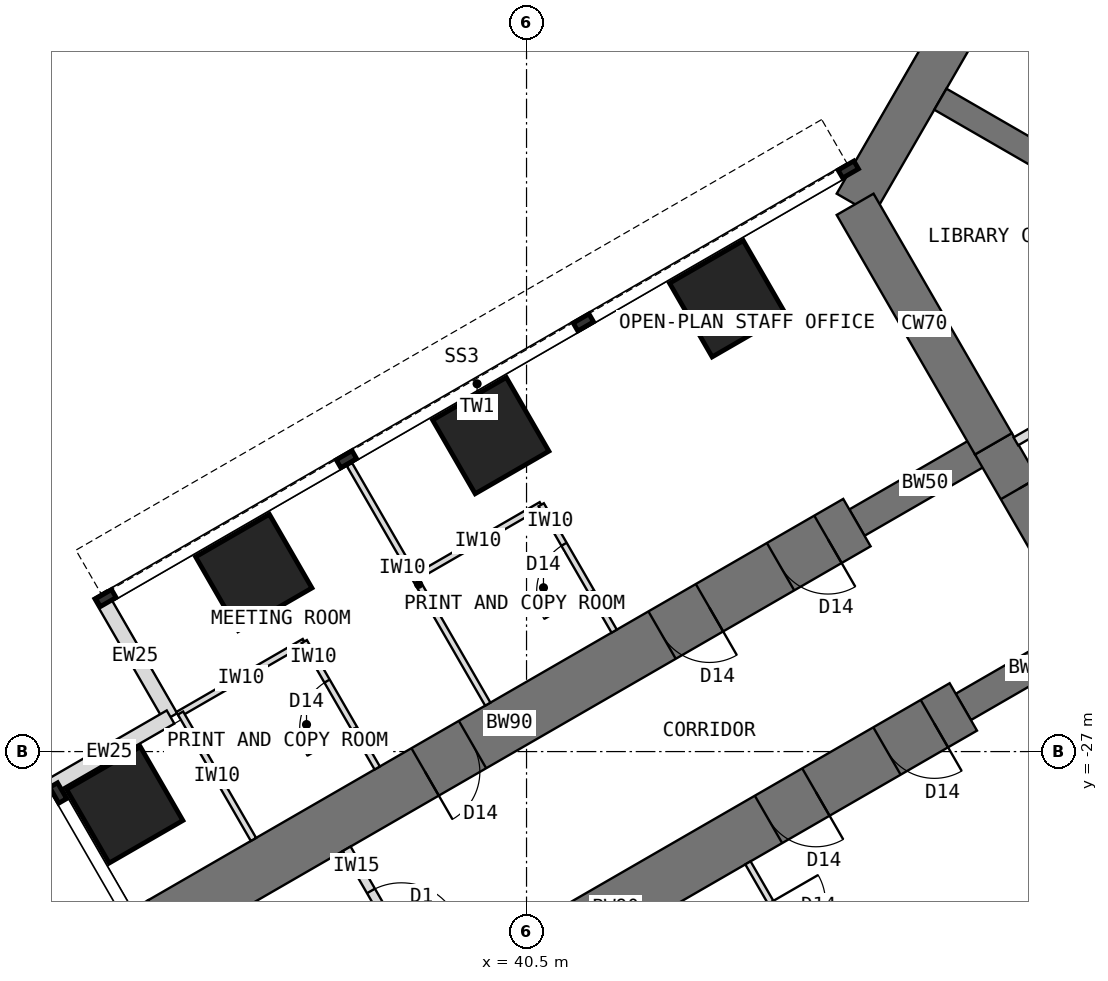
"""IFC4 building model, lengths in metres.
Left out: names, types, materials, properties, quantities, classifications, styles, units other than length and angle.
Written with IfcOpenShell. Run it as: python <this file> out.ifc"""

import sys

from ifc_helpers import new_model, si_unit, direction, frame, frame_2d, origin, origin_2d, place, context, subcontext, project, spatial, rectangle, extrude, element, fill, save


model = new_model("IFC4")
c1 = context("Model", 3, precision=1e-05, world=origin(), true_north=direction((0.0, 1.0)))
c2 = subcontext(c1, "Body", "Model", "MODEL_VIEW")
j1 = project(units=[si_unit("LENGTHUNIT", "METRE"), si_unit("PLANEANGLEUNIT", "RADIAN")], contexts=[c1])
p1 = place(None, origin())
s1 = spatial("IfcSite", under=j1, at=p1, CompositionType="ELEMENT")
p2 = place(p1, origin())
s2 = spatial("IfcBuilding", under=s1, at=p2, CompositionType="ELEMENT")
p3 = place(p2, frame((0.0, 0.0, 72.5)))
s3 = spatial("IfcBuildingStorey", under=s2, at=p3, CompositionType="ELEMENT", Elevation=72.5)
p4 = place(p3, frame((52.202, -7.092, 0.0), z_axis=(0.0, 0.0, 1.0), x_axis=(-0.500005998175, -0.866021940709, 0.0)))
e1 = element("IfcWall", 1, at=p4, inside=s3, PredefinedType="SHEAR", context=c2, shape_type="SweptSolid", body=[
    extrude(rectangle(XDim=12.596, YDim=0.7, at=frame_2d((6.298, 0.0))), origin(), (0.0, 0.0, 1.0), 4.0),
])
p5 = place(p3, frame((45.904, -18.0, 0.0), z_axis=(0.0, 0.0, 1.0), x_axis=(0.500024481964, -0.866011268655, 0.0)))
e2 = element("IfcWall", 2, at=p5, inside=s3, PredefinedType="SHEAR", context=c2, shape_type="SweptSolid", body=[
    extrude(rectangle(XDim=4.548, YDim=0.7, at=frame_2d((2.274, 0.0))), origin(), (0.0, 0.0, 1.0), 4.0),
])
p6 = place(p3, frame((48.178, -21.939, 0.0), z_axis=(0.0, 0.0, 1.0), x_axis=(0.500010275428, -0.866019471182, 0.0)))
e3 = element("IfcWall", 3, at=p6, inside=s3, PredefinedType="SHEAR", context=c2, shape_type="SweptSolid", body=[
    extrude(rectangle(XDim=3.5, YDim=0.7, at=frame_2d((1.75, 0.0))), origin(), (0.0, 0.0, 1.0), 4.0),
])
p7 = place(p6, frame((0.85, 0.0, 0.0)))
e4 = element("IfcOpeningElement", 4, at=p7, cuts=e3, PredefinedType="OPENING", context=c2, shape_type="SweptSolid", body=[
    extrude(rectangle(XDim=1.8, YDim=2.1, at=frame_2d((0.9, 1.05))), frame((0.0, 0.36, 0.0), z_axis=(0.0, -1.0, 0.0), x_axis=(1.0, 0.0, 0.0)), (0.0, 0.0, 1.0), 0.72),
])
p8 = place(p3, frame((49.928, -24.97, 0.0), z_axis=(0.0, 0.0, 1.0), x_axis=(-0.866031863473, -0.499988811324, 0.0)))
e5 = element("IfcWall", 5, at=p8, inside=s3, PredefinedType="SHEAR", context=c2, shape_type="SweptSolid", body=[
    extrude(rectangle(XDim=2.592, YDim=0.5, at=frame_2d((1.296, 0.0))), origin(), (0.0, 0.0, 1.0), 4.0),
])
p9 = place(p3, frame((47.684, -26.266, 0.0), z_axis=(0.0, 0.0, 1.0), x_axis=(-0.866027579429, -0.499996231654, 0.0)))
e6 = element("IfcWall", 6, at=p9, inside=s3, PredefinedType="SHEAR", context=c2, shape_type="SweptSolid", body=[
    extrude(rectangle(XDim=13.2, YDim=0.9, at=frame_2d((6.6, 0.0))), origin(), (0.0, 0.0, 1.0), 4.0),
])
p10 = place(p9, frame((0.55, 0.0, 0.0)))
e7 = element("IfcOpeningElement", 7, at=p10, cuts=e6, PredefinedType="OPENING", context=c2, shape_type="SweptSolid", body=[
    extrude(rectangle(XDim=0.9, YDim=2.1, at=frame_2d((0.45, 1.05))), frame((0.0, 0.46, 0.0), z_axis=(0.0, -1.0, 0.0), x_axis=(1.0, 0.0, 0.0)), (0.0, 0.0, 1.0), 0.92),
])
p11 = place(p9, frame((2.8, 0.0, 0.0)))
e8 = element("IfcOpeningElement", 8, at=p11, cuts=e6, PredefinedType="OPENING", context=c2, shape_type="SweptSolid", body=[
    extrude(rectangle(XDim=0.9, YDim=2.1, at=frame_2d((0.45, 1.05))), frame((0.0, 0.46, 0.0), z_axis=(0.0, -1.0, 0.0), x_axis=(1.0, 0.0, 0.0)), (0.0, 0.0, 1.0), 0.92),
])
p12 = place(p9, frame((7.3, 0.0, 0.0)))
e9 = element("IfcOpeningElement", 9, at=p12, cuts=e6, PredefinedType="OPENING", context=c2, shape_type="SweptSolid", body=[
    extrude(rectangle(XDim=0.9, YDim=2.1, at=frame_2d((0.45, 1.05))), frame((0.0, 0.46, 0.0), z_axis=(0.0, -1.0, 0.0), x_axis=(1.0, 0.0, 0.0)), (0.0, 0.0, 1.0), 0.92),
])
p13 = place(p3, frame((48.178, -21.939, 0.0), z_axis=(0.0, 0.0, 1.0), x_axis=(-0.866072649678, -0.499918158782, 0.0)))
e10 = element("IfcWall", 10, at=p13, inside=s3, PredefinedType="SHEAR", context=c2, shape_type="SweptSolid", body=[
    extrude(rectangle(XDim=2.592, YDim=0.5, at=frame_2d((1.296, 0.0))), origin(), (0.0, 0.0, 1.0), 4.0),
])
p14 = place(p3, frame((45.934, -23.234, 0.0), z_axis=(0.0, 0.0, 1.0), x_axis=(-0.866019570528, -0.500010103361, 0.0)))
e11 = element("IfcWall", 11, at=p14, inside=s3, PredefinedType="SHEAR", context=c2, shape_type="SweptSolid", body=[
    extrude(rectangle(XDim=13.2, YDim=0.9, at=frame_2d((6.6, 0.0))), origin(), (0.0, 0.0, 1.0), 4.0),
])
p15 = place(p14, frame((0.55, 0.0, 0.0)))
e12 = element("IfcOpeningElement", 12, at=p15, cuts=e11, PredefinedType="OPENING", context=c2, shape_type="SweptSolid", body=[
    extrude(rectangle(XDim=0.9, YDim=2.1, at=frame_2d((0.45, 1.05))), frame((0.0, 0.46, 0.0), z_axis=(0.0, -1.0, 0.0), x_axis=(1.0, 0.0, 0.0)), (0.0, 0.0, 1.0), 0.92),
])
p16 = place(p14, frame((2.8, 0.0, 0.0)))
e13 = element("IfcOpeningElement", 13, at=p16, cuts=e11, PredefinedType="OPENING", context=c2, shape_type="SweptSolid", body=[
    extrude(rectangle(XDim=0.9, YDim=2.1, at=frame_2d((0.45, 1.05))), frame((0.0, 0.46, 0.0), z_axis=(0.0, -1.0, 0.0), x_axis=(1.0, 0.0, 0.0)), (0.0, 0.0, 1.0), 0.92),
])
p17 = place(p14, frame((7.3, 0.0, 0.0)))
e14 = element("IfcOpeningElement", 14, at=p17, cuts=e11, PredefinedType="OPENING", context=c2, shape_type="SweptSolid", body=[
    extrude(rectangle(XDim=0.9, YDim=2.1, at=frame_2d((0.45, 1.05))), frame((0.0, 0.46, 0.0), z_axis=(0.0, -1.0, 0.0), x_axis=(1.0, 0.0, 0.0)), (0.0, 0.0, 1.0), 0.92),
])
for number, where, z_axis, x_axis in (
    (15, (43.809, -19.554, 0.0), (0.0, 0.0, 1.0), (0.866, 0.5, 0.0)),
    (16, (39.912, -21.804, 0.0), (0.0, 0.0, 1.0), (0.866, 0.5, 0.0)),
    (17, (36.014, -24.054, 0.0), (0.0, 0.0, 1.0), (0.866, 0.5, 0.0)),
    (18, (33.892, -27.877, 0.0), (0.0, 0.0, 1.0), (0.866, 0.5, 0.0)),
):
    element("IfcColumn", number, at=place(p3, frame(where, z_axis=z_axis, x_axis=x_axis)), inside=s3, PredefinedType="COLUMN", context=c2, shape_type="SweptSolid", body=[
        extrude(rectangle(XDim=1.4, YDim=1.4, at=origin_2d()), origin(), (0.0, 0.0, 1.0), 4.0),
    ])
for number, where, z_axis, x_axis in (
    (19, (33.483, -24.419, 0.0), (0.0, 0.0, 1.0), (0.5, -0.866, 0.0)),
    (20, (34.645, -26.432, 0.0), (0.0, 0.0, 1.0), (-0.866, -0.5, 0.0)),
):
    element("IfcWall", number, at=place(p3, frame(where, z_axis=z_axis, x_axis=x_axis)), inside=s3, PredefinedType="STANDARD", context=c2, shape_type="SweptSolid", body=[
        extrude(rectangle(XDim=2.325, YDim=0.25, at=frame_2d((1.163, 0.0))), origin(), (0.0, 0.0, 1.0), 3.8),
    ])
p18 = place(p3, frame((34.502, -29.834, 0.0), z_axis=(0.0, 0.0, 1.0), x_axis=(-0.866054481515, -0.499949632511, 0.0)))
e21 = element("IfcWall", 21, at=p18, inside=s3, PredefinedType="PARTITIONING", context=c2, shape_type="SweptSolid", body=[
    extrude(rectangle(XDim=0.31, YDim=0.9, at=frame_2d((0.155, 0.0))), origin(), (0.0, 0.0, 1.0), 3.8),
])
p19 = place(p3, frame((52.38, -19.201, 0.0), z_axis=(0.0, 0.0, 1.0), x_axis=(-0.866023886965, 0.500002627198, 0.0)))
e22 = element("IfcWall", 22, at=p19, inside=s3, PredefinedType="SHEAR", context=c2, shape_type="SweptSolid", body=[
    extrude(rectangle(XDim=5.858, YDim=0.4, at=frame_2d((2.929, 0.0))), origin(), (0.0, 0.0, 1.0), 4.0),
])
p20 = place(p3, frame((44.141, -28.83, 0.0), z_axis=(0.0, 0.0, 1.0), x_axis=(0.500077600433, -0.865980596518, 0.0)))
e23 = element("IfcWall", 23, at=p20, inside=s3, PredefinedType="PARTITIONING", context=c2, shape_type="SweptSolid", body=[
    extrude(rectangle(XDim=2.4, YDim=0.1, at=frame_2d((1.2, 0.0))), origin(), (0.0, 0.0, 1.0), 3.8),
])
p21 = place(p20, frame((0.75, 0.0, 0.0)))
e24 = element("IfcOpeningElement", 24, at=p21, cuts=e23, PredefinedType="OPENING", context=c2, shape_type="SweptSolid", body=[
    extrude(rectangle(XDim=0.9, YDim=2.1, at=frame_2d((0.45, 1.05))), frame((0.0, 0.06, 0.0), z_axis=(0.0, -1.0, 0.0), x_axis=(1.0, 0.0, 0.0)), (0.0, 0.0, 1.0), 0.12),
])
p22 = place(p3, frame((39.863, -26.22, 0.0), z_axis=(0.0, 0.0, 1.0), x_axis=(-0.500022803284, 0.866012237902, 0.0)))
e25 = element("IfcWall", 25, at=p22, inside=s3, PredefinedType="PARTITIONING", context=c2, shape_type="SweptSolid", body=[
    extrude(rectangle(XDim=4.55, YDim=0.1, at=frame_2d((2.275, 0.0))), origin(), (0.0, 0.0, 1.0), 3.8),
])
p23 = place(p3, frame((40.741, -22.941, 0.0), z_axis=(0.0, 0.0, 1.0), x_axis=(-0.865980596518, -0.500077600433, 0.0)))
e26 = element("IfcWall", 26, at=p23, inside=s3, PredefinedType="PARTITIONING", context=c2, shape_type="SweptSolid", body=[
    extrude(rectangle(XDim=2.4, YDim=0.1, at=frame_2d((1.2, 0.0))), origin(), (0.0, 0.0, 1.0), 3.8),
])
p24 = place(p3, frame((41.941, -25.02, 0.0), z_axis=(0.0, 0.0, 1.0), x_axis=(-0.499957262057, 0.866050077142, 0.0)))
e27 = element("IfcWall", 27, at=p24, inside=s3, PredefinedType="PARTITIONING", context=c2, shape_type="SweptSolid", body=[
    extrude(rectangle(XDim=2.4, YDim=0.1, at=frame_2d((1.2, 0.0))), origin(), (0.0, 0.0, 1.0), 3.8),
])
p25 = place(p24, frame((0.75, 0.0, 0.0)))
e28 = element("IfcOpeningElement", 28, at=p25, cuts=e27, PredefinedType="OPENING", context=c2, shape_type="SweptSolid", body=[
    extrude(rectangle(XDim=0.9, YDim=2.1, at=frame_2d((0.45, 1.05))), frame((0.0, 0.06, 0.0), z_axis=(0.0, -1.0, 0.0), x_axis=(1.0, 0.0, 0.0)), (0.0, 0.0, 1.0), 0.12),
])
p26 = place(p3, frame((36.844, -25.191, 0.0), z_axis=(0.0, 0.0, 1.0), x_axis=(-0.865980596518, -0.500077600433, 0.0)))
e29 = element("IfcWall", 29, at=p26, inside=s3, PredefinedType="PARTITIONING", context=c2, shape_type="SweptSolid", body=[
    extrude(rectangle(XDim=2.4, YDim=0.1, at=frame_2d((1.2, 0.0))), origin(), (0.0, 0.0, 1.0), 3.8),
])
p27 = place(p3, frame((38.044, -27.27, 0.0), z_axis=(0.0, 0.0, 1.0), x_axis=(-0.500033551112, 0.866006032174, 0.0)))
e30 = element("IfcWall", 30, at=p27, inside=s3, PredefinedType="PARTITIONING", context=c2, shape_type="SweptSolid", body=[
    extrude(rectangle(XDim=2.4, YDim=0.1, at=frame_2d((1.2, 0.0))), origin(), (0.0, 0.0, 1.0), 3.8),
])
p28 = place(p27, frame((0.75, 0.0, 0.0)))
e31 = element("IfcOpeningElement", 31, at=p28, cuts=e30, PredefinedType="OPENING", context=c2, shape_type="SweptSolid", body=[
    extrude(rectangle(XDim=0.9, YDim=2.1, at=frame_2d((0.45, 1.05))), frame((0.0, 0.06, 0.0), z_axis=(0.0, -1.0, 0.0), x_axis=(1.0, 0.0, 0.0)), (0.0, 0.0, 1.0), 0.12),
])
p29 = place(p3, frame((36.009, -28.445, 0.0), z_axis=(0.0, 0.0, 1.0), x_axis=(-0.500033551112, 0.866006032174, 0.0)))
e32 = element("IfcWall", 32, at=p29, inside=s3, PredefinedType="PARTITIONING", context=c2, shape_type="SweptSolid", body=[
    extrude(rectangle(XDim=2.4, YDim=0.1, at=frame_2d((1.2, 0.0))), origin(), (0.0, 0.0, 1.0), 3.8),
])
p30 = place(p3, frame((48.548, -21.898, 0.0), z_axis=(0.0, 0.0, 1.0), x_axis=(0.866025445582, 0.499999927604, 0.0)))
e33 = element("IfcWall", 33, at=p30, inside=s3, PredefinedType="PARTITIONING", context=c2, shape_type="SweptSolid", body=[
    extrude(rectangle(XDim=4.468, YDim=0.15, at=frame_2d((2.234, 0.0))), origin(), (0.0, 0.0, 1.0), 3.8),
])
p31 = place(p30, frame((1.724, 0.0, 0.0)))
e34 = element("IfcOpeningElement", 34, at=p31, cuts=e33, PredefinedType="OPENING", context=c2, shape_type="SweptSolid", body=[
    extrude(rectangle(XDim=1.0, YDim=2.1, at=frame_2d((0.5, 1.05))), frame((0.0, 0.085, 0.0), z_axis=(0.0, -1.0, 0.0), x_axis=(1.0, 0.0, 0.0)), (0.0, 0.0, 1.0), 0.17),
])
p32 = place(p3, frame((37.542, -28.599, 0.0), z_axis=(0.0, 0.0, 1.0), x_axis=(0.500006934395, -0.866021400173, 0.0)))
e35 = element("IfcWall", 35, at=p32, inside=s3, PredefinedType="PARTITIONING", context=c2, shape_type="SweptSolid", body=[
    extrude(rectangle(XDim=2.6, YDim=0.15, at=frame_2d((1.3, 0.0))), origin(), (0.0, 0.0, 1.0), 3.8),
])
p33 = place(p32, frame((0.8, 0.0, 0.0)))
e36 = element("IfcOpeningElement", 36, at=p33, cuts=e35, PredefinedType="OPENING", context=c2, shape_type="SweptSolid", body=[
    extrude(rectangle(XDim=1.0, YDim=2.1, at=frame_2d((0.5, 1.05))), frame((0.0, 0.085, 0.0), z_axis=(0.0, -1.0, 0.0), x_axis=(1.0, 0.0, 0.0)), (0.0, 0.0, 1.0), 0.17),
])
p34 = place(p7, origin())
e37 = element("IfcDoor", 37, at=p34, inside=s3, OperationType="DOUBLE_DOOR_DOUBLE_SWING", PredefinedType="DOOR", context=c2, shape_type="SweptSolid", body=[
    extrude(rectangle(XDim=1.72, YDim=2.06, at=frame_2d((0.9, 1.03))), frame((0.0, 0.025, 0.0), z_axis=(0.0, -1.0, 0.0), x_axis=(1.0, 0.0, 0.0)), (0.0, 0.0, 1.0), 0.05),
    extrude(rectangle(XDim=0.04, YDim=2.1, at=frame_2d((0.02, 1.05))), frame((0.0, 0.35, 0.0), z_axis=(0.0, -1.0, 0.0), x_axis=(1.0, 0.0, 0.0)), (0.0, 0.0, 1.0), 0.699),
    extrude(rectangle(XDim=0.04, YDim=2.1, at=frame_2d((1.78, 1.05))), frame((0.0, 0.35, 0.0), z_axis=(0.0, -1.0, 0.0), x_axis=(1.0, 0.0, 0.0)), (0.0, 0.0, 1.0), 0.699),
    extrude(rectangle(XDim=1.72, YDim=0.04, at=frame_2d((0.9, 2.08))), frame((0.0, 0.35, 0.0), z_axis=(0.0, -1.0, 0.0), x_axis=(1.0, 0.0, 0.0)), (0.0, 0.0, 1.0), 0.699),
])
fill(e4, e37)
p35 = place(p21, origin())
e38 = element("IfcDoor", 38, at=p35, inside=s3, OperationType="SINGLE_SWING_LEFT", PredefinedType="DOOR", context=c2, shape_type="SweptSolid", body=[
    extrude(rectangle(XDim=0.9, YDim=2.1, at=frame_2d((0.45, 1.05))), frame((0.0, 0.025, 0.0), z_axis=(0.0, -1.0, 0.0), x_axis=(1.0, 0.0, 0.0)), (0.0, 0.0, 1.0), 0.05),
])
fill(e24, e38)
p36 = place(p25, origin())
e39 = element("IfcDoor", 39, at=p36, inside=s3, OperationType="SINGLE_SWING_LEFT", PredefinedType="DOOR", context=c2, shape_type="SweptSolid", body=[
    extrude(rectangle(XDim=0.9, YDim=2.1, at=frame_2d((0.45, 1.05))), frame((0.0, 0.025, 0.0), z_axis=(0.0, -1.0, 0.0), x_axis=(1.0, 0.0, 0.0)), (0.0, 0.0, 1.0), 0.05),
])
fill(e28, e39)
p37 = place(p28, origin())
e40 = element("IfcDoor", 40, at=p37, inside=s3, OperationType="SINGLE_SWING_LEFT", PredefinedType="DOOR", context=c2, shape_type="SweptSolid", body=[
    extrude(rectangle(XDim=0.9, YDim=2.1, at=frame_2d((0.45, 1.05))), frame((0.0, 0.025, 0.0), z_axis=(0.0, -1.0, 0.0), x_axis=(1.0, 0.0, 0.0)), (0.0, 0.0, 1.0), 0.05),
])
fill(e31, e40)
p38 = place(p33, origin())
e41 = element("IfcDoor", 41, at=p38, inside=s3, OperationType="SINGLE_SWING_RIGHT", PredefinedType="DOOR", context=c2, shape_type="SweptSolid", body=[
    extrude(rectangle(XDim=1.0, YDim=2.1, at=frame_2d((0.5, 1.05))), frame((0.0, 0.025, 0.0), z_axis=(0.0, -1.0, 0.0), x_axis=(1.0, 0.0, 0.0)), (0.0, 0.0, 1.0), 0.05),
])
fill(e36, e41)
p39 = place(p10, origin())
e42 = element("IfcDoor", 42, at=p39, inside=s3, OperationType="SINGLE_SWING_LEFT", PredefinedType="DOOR", context=c2, shape_type="SweptSolid", body=[
    extrude(rectangle(XDim=0.82, YDim=2.06, at=frame_2d((0.45, 1.03))), frame((0.0, 0.025, 0.0), z_axis=(0.0, -1.0, 0.0), x_axis=(1.0, 0.0, 0.0)), (0.0, 0.0, 1.0), 0.05),
    extrude(rectangle(XDim=0.04, YDim=2.1, at=frame_2d((0.02, 1.05))), frame((0.0, 0.45, 0.0), z_axis=(0.0, -1.0, 0.0), x_axis=(1.0, 0.0, 0.0)), (0.0, 0.0, 1.0), 0.899),
    extrude(rectangle(XDim=0.04, YDim=2.1, at=frame_2d((0.88, 1.05))), frame((0.0, 0.45, 0.0), z_axis=(0.0, -1.0, 0.0), x_axis=(1.0, 0.0, 0.0)), (0.0, 0.0, 1.0), 0.899),
    extrude(rectangle(XDim=0.82, YDim=0.04, at=frame_2d((0.45, 2.08))), frame((0.0, 0.45, 0.0), z_axis=(0.0, -1.0, 0.0), x_axis=(1.0, 0.0, 0.0)), (0.0, 0.0, 1.0), 0.899),
])
fill(e7, e42)
p40 = place(p11, origin())
e43 = element("IfcDoor", 43, at=p40, inside=s3, OperationType="SINGLE_SWING_LEFT", PredefinedType="DOOR", context=c2, shape_type="SweptSolid", body=[
    extrude(rectangle(XDim=0.82, YDim=2.06, at=frame_2d((0.45, 1.03))), frame((0.0, 0.025, 0.0), z_axis=(0.0, -1.0, 0.0), x_axis=(1.0, 0.0, 0.0)), (0.0, 0.0, 1.0), 0.05),
    extrude(rectangle(XDim=0.04, YDim=2.1, at=frame_2d((0.02, 1.05))), frame((0.0, 0.45, 0.0), z_axis=(0.0, -1.0, 0.0), x_axis=(1.0, 0.0, 0.0)), (0.0, 0.0, 1.0), 0.899),
    extrude(rectangle(XDim=0.04, YDim=2.1, at=frame_2d((0.88, 1.05))), frame((0.0, 0.45, 0.0), z_axis=(0.0, -1.0, 0.0), x_axis=(1.0, 0.0, 0.0)), (0.0, 0.0, 1.0), 0.899),
    extrude(rectangle(XDim=0.82, YDim=0.04, at=frame_2d((0.45, 2.08))), frame((0.0, 0.45, 0.0), z_axis=(0.0, -1.0, 0.0), x_axis=(1.0, 0.0, 0.0)), (0.0, 0.0, 1.0), 0.899),
])
fill(e8, e43)
p41 = place(p15, origin())
e44 = element("IfcDoor", 44, at=p41, inside=s3, OperationType="SINGLE_SWING_LEFT", PredefinedType="DOOR", context=c2, shape_type="SweptSolid", body=[
    extrude(rectangle(XDim=0.82, YDim=2.06, at=frame_2d((0.45, 1.03))), frame((0.0, 0.025, 0.0), z_axis=(0.0, -1.0, 0.0), x_axis=(1.0, 0.0, 0.0)), (0.0, 0.0, 1.0), 0.05),
    extrude(rectangle(XDim=0.04, YDim=2.1, at=frame_2d((0.02, 1.05))), frame((0.0, 0.45, 0.0), z_axis=(0.0, -1.0, 0.0), x_axis=(1.0, 0.0, 0.0)), (0.0, 0.0, 1.0), 0.899),
    extrude(rectangle(XDim=0.04, YDim=2.1, at=frame_2d((0.88, 1.05))), frame((0.0, 0.45, 0.0), z_axis=(0.0, -1.0, 0.0), x_axis=(1.0, 0.0, 0.0)), (0.0, 0.0, 1.0), 0.899),
    extrude(rectangle(XDim=0.82, YDim=0.04, at=frame_2d((0.45, 2.08))), frame((0.0, 0.45, 0.0), z_axis=(0.0, -1.0, 0.0), x_axis=(1.0, 0.0, 0.0)), (0.0, 0.0, 1.0), 0.899),
])
fill(e12, e44)
p42 = place(p16, origin())
e45 = element("IfcDoor", 45, at=p42, inside=s3, OperationType="SINGLE_SWING_LEFT", PredefinedType="DOOR", context=c2, shape_type="SweptSolid", body=[
    extrude(rectangle(XDim=0.82, YDim=2.06, at=frame_2d((0.45, 1.03))), frame((0.0, 0.025, 0.0), z_axis=(0.0, -1.0, 0.0), x_axis=(1.0, 0.0, 0.0)), (0.0, 0.0, 1.0), 0.05),
    extrude(rectangle(XDim=0.04, YDim=2.1, at=frame_2d((0.02, 1.05))), frame((0.0, 0.45, 0.0), z_axis=(0.0, -1.0, 0.0), x_axis=(1.0, 0.0, 0.0)), (0.0, 0.0, 1.0), 0.899),
    extrude(rectangle(XDim=0.04, YDim=2.1, at=frame_2d((0.88, 1.05))), frame((0.0, 0.45, 0.0), z_axis=(0.0, -1.0, 0.0), x_axis=(1.0, 0.0, 0.0)), (0.0, 0.0, 1.0), 0.899),
    extrude(rectangle(XDim=0.82, YDim=0.04, at=frame_2d((0.45, 2.08))), frame((0.0, 0.45, 0.0), z_axis=(0.0, -1.0, 0.0), x_axis=(1.0, 0.0, 0.0)), (0.0, 0.0, 1.0), 0.899),
])
fill(e13, e45)
p43 = place(p17, origin())
e46 = element("IfcDoor", 46, at=p43, inside=s3, OperationType="SINGLE_SWING_RIGHT", PredefinedType="DOOR", context=c2, shape_type="SweptSolid", body=[
    extrude(rectangle(XDim=0.82, YDim=2.06, at=frame_2d((0.45, 1.03))), frame((0.0, 0.025, 0.0), z_axis=(0.0, -1.0, 0.0), x_axis=(1.0, 0.0, 0.0)), (0.0, 0.0, 1.0), 0.05),
    extrude(rectangle(XDim=0.04, YDim=2.1, at=frame_2d((0.02, 1.05))), frame((0.0, 0.45, 0.0), z_axis=(0.0, -1.0, 0.0), x_axis=(1.0, 0.0, 0.0)), (0.0, 0.0, 1.0), 0.899),
    extrude(rectangle(XDim=0.04, YDim=2.1, at=frame_2d((0.88, 1.05))), frame((0.0, 0.45, 0.0), z_axis=(0.0, -1.0, 0.0), x_axis=(1.0, 0.0, 0.0)), (0.0, 0.0, 1.0), 0.899),
    extrude(rectangle(XDim=0.82, YDim=0.04, at=frame_2d((0.45, 2.08))), frame((0.0, 0.45, 0.0), z_axis=(0.0, -1.0, 0.0), x_axis=(1.0, 0.0, 0.0)), (0.0, 0.0, 1.0), 0.899),
])
fill(e14, e46)
save(model, sys.argv[1])
